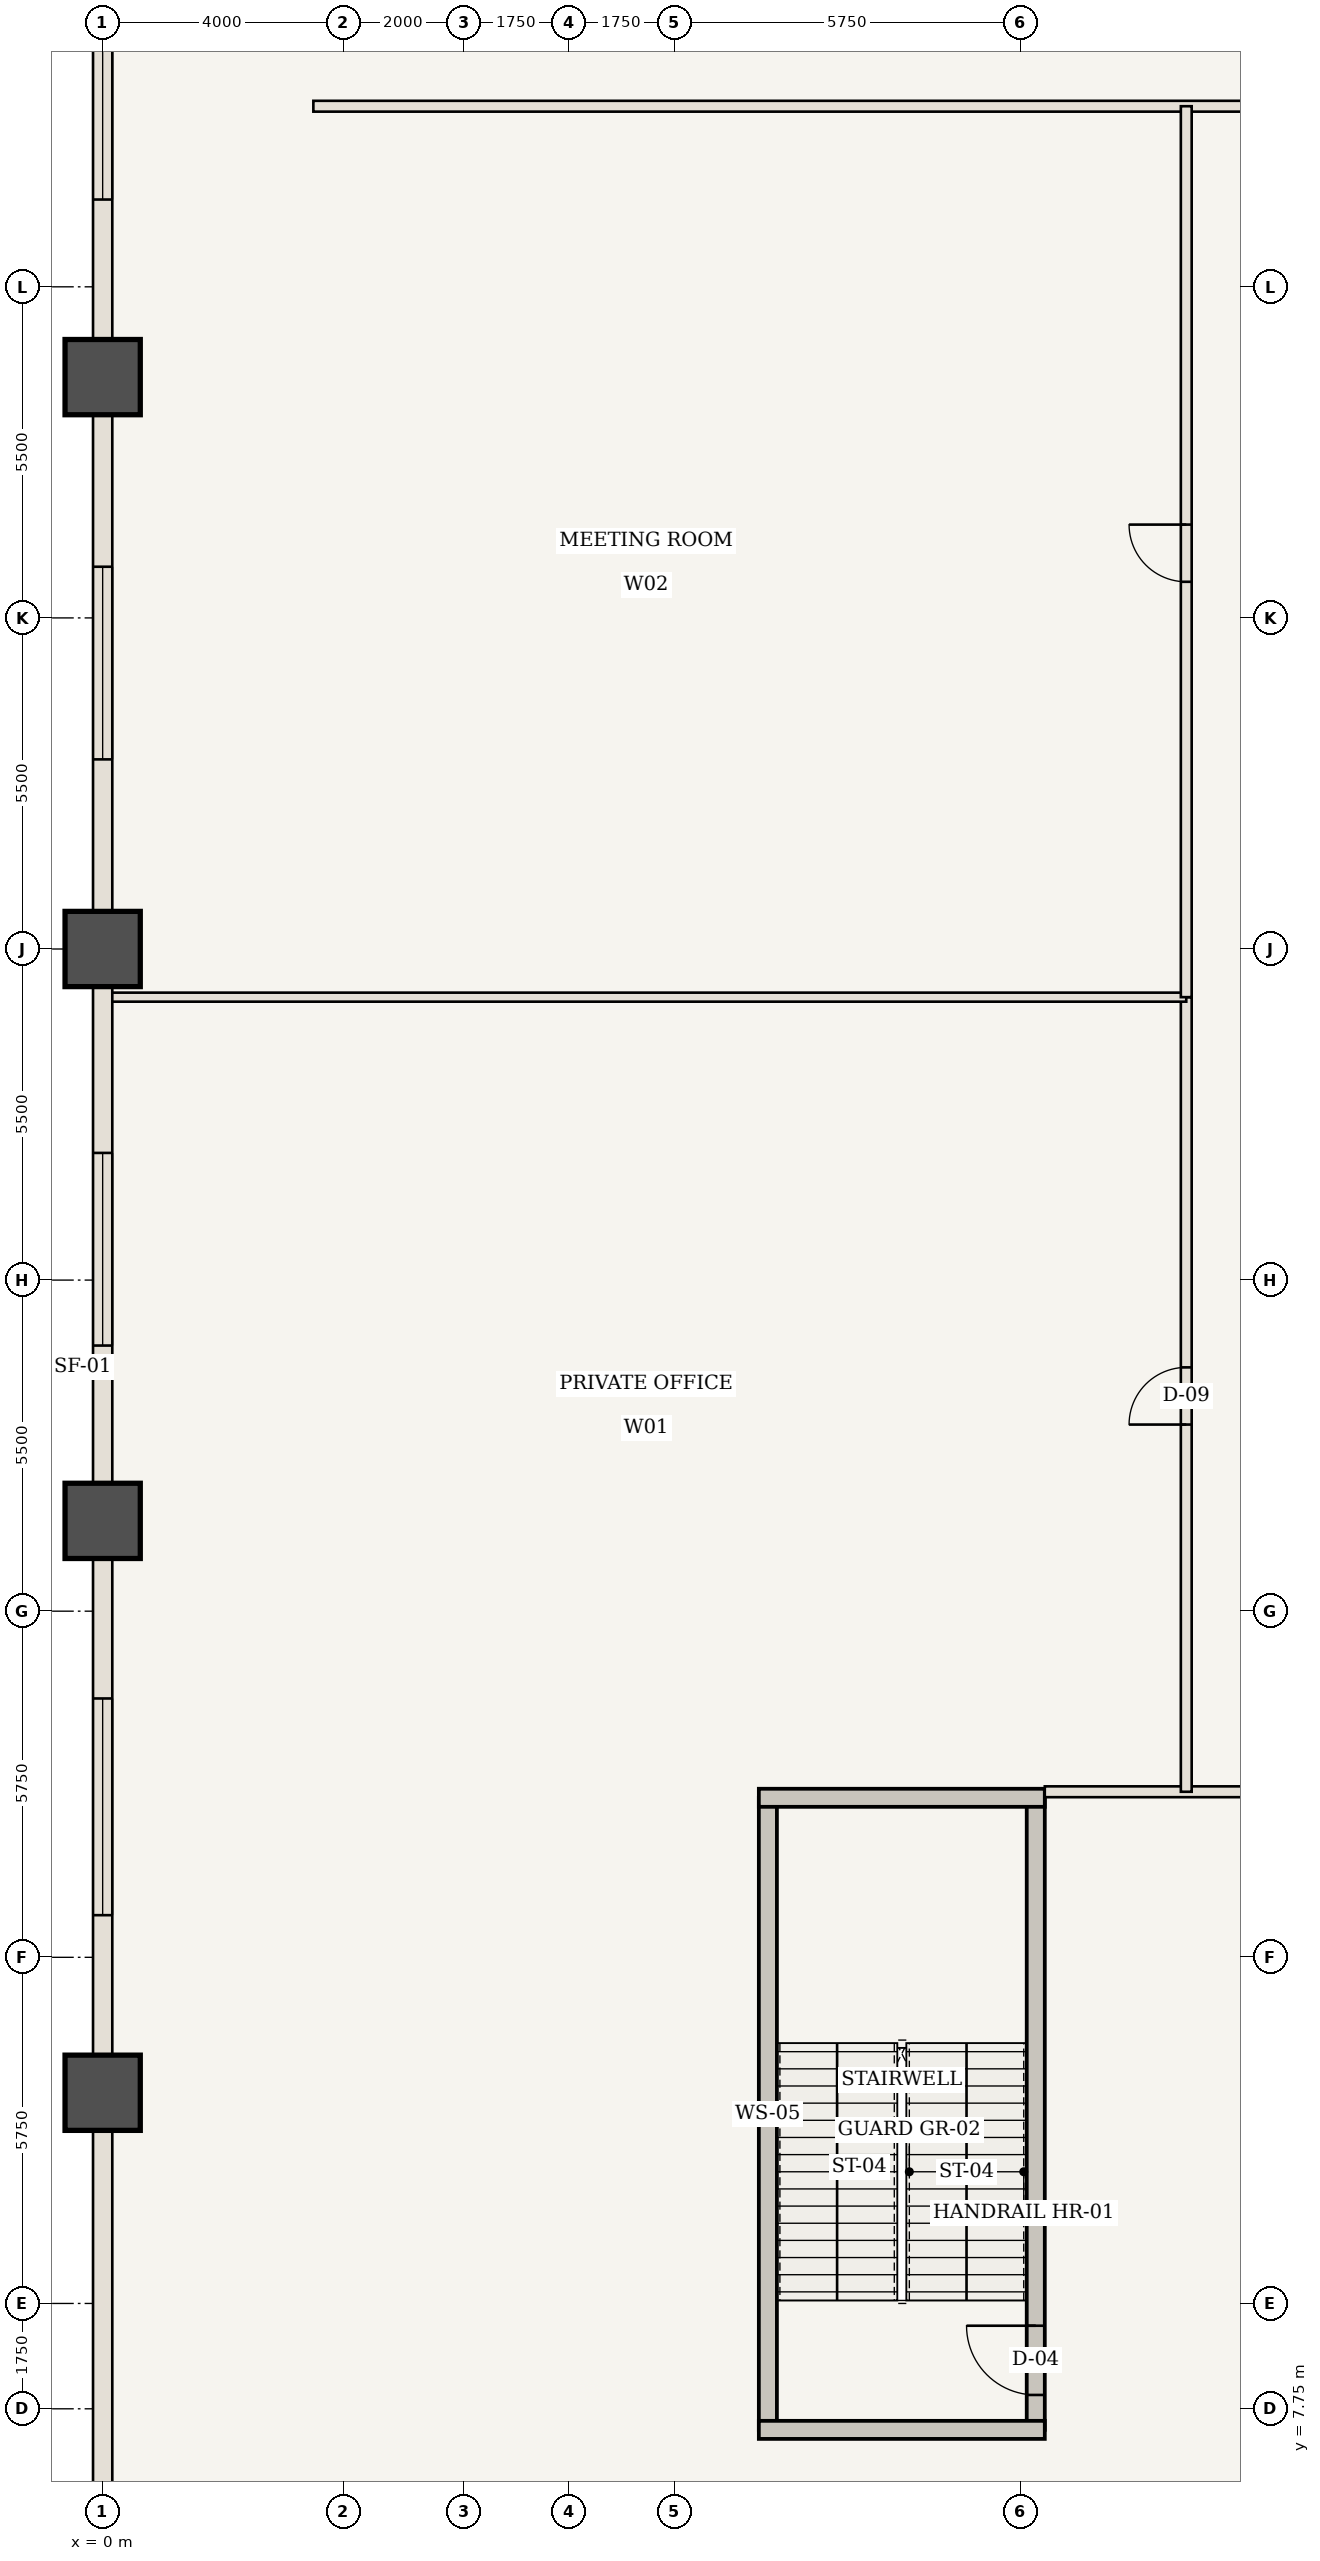
"""IFC4 building model, lengths in metres.
Left out: names, types, materials, properties, quantities, classifications, styles, units other than length and angle.
Written with IfcOpenShell. Run it as: python <this file> out.ifc"""

import sys

from ifc_helpers import new_model, si_unit, direction, frame, frame_2d, origin, origin_2d, place, context, subcontext, project, spatial, rectangle, extrude, element, fill, save


model = new_model("IFC4")
c1 = context("Model", 3, precision=1e-05, world=origin(), true_north=direction((0.0, 1.0)))
c2 = subcontext(c1, "Body", "Model", "MODEL_VIEW")
j1 = project(units=[si_unit("LENGTHUNIT", "METRE"), si_unit("PLANEANGLEUNIT", "RADIAN")], contexts=[c1])
p1 = place(None, origin())
s1 = spatial("IfcSite", under=j1, at=p1, CompositionType="ELEMENT")
p2 = place(p1, origin())
s2 = spatial("IfcBuilding", under=s1, at=p2, CompositionType="ELEMENT")
p3 = place(p2, frame((0.0, 0.0, 23.8)))
s3 = spatial("IfcBuildingStorey", under=s2, at=p3, CompositionType="ELEMENT", Elevation=23.8)
for number, where, z_axis, x_axis in (
    (1, (0.0, 13.0, 0.0), (0.0, 0.0, 1.0), (1.0, 0.0, 0.0)),
    (2, (0.0, 22.5, 0.0), (0.0, 0.0, 1.0), (1.0, 0.0, 0.0)),
    (3, (0.0, 32.0, 0.0), (0.0, 0.0, 1.0), (1.0, 0.0, 0.0)),
    (4, (0.0, 41.5, 0.0), (0.0, 0.0, 1.0), (1.0, 0.0, 0.0)),
):
    element("IfcColumn", number, at=place(p3, frame(where, z_axis=z_axis, x_axis=x_axis)), inside=s3, PredefinedType="COLUMN", context=c2, shape_type="SweptSolid", body=[
        extrude(rectangle(XDim=1.25, YDim=1.25, at=origin_2d()), origin(), (0.0, 0.0, 1.0), 5.6),
    ])
p4 = place(p3, frame((11.05, 7.4, 0.0), z_axis=(0.0, 0.0, 1.0), x_axis=(0.0, 1.0, 0.0)))
e5 = element("IfcWall", 5, at=p4, inside=s3, PredefinedType="SHEAR", context=c2, shape_type="SweptSolid", body=[
    extrude(rectangle(XDim=10.5, YDim=0.3, at=frame_2d((5.25, 0.0))), origin(), (0.0, 0.0, 1.0), 5.18),
])
p5 = place(p3, frame((15.5, 7.4, 0.0), z_axis=(0.0, 0.0, 1.0), x_axis=(0.0, 1.0, 0.0)))
e6 = element("IfcWall", 6, at=p5, inside=s3, PredefinedType="SHEAR", context=c2, shape_type="SweptSolid", body=[
    extrude(rectangle(XDim=10.5, YDim=0.3, at=frame_2d((5.25, 0.0))), origin(), (0.0, 0.0, 1.0), 5.18),
])
p6 = place(p5, frame((0.58, 0.0, 0.0)))
e7 = element("IfcOpeningElement", 7, at=p6, cuts=e6, PredefinedType="OPENING", context=c2, shape_type="SweptSolid", body=[
    extrude(rectangle(XDim=1.15, YDim=2.15, at=frame_2d((0.575, 1.075))), frame((0.0, 0.16, 0.0), z_axis=(0.0, -1.0, 0.0), x_axis=(1.0, 0.0, 0.0)), (0.0, 0.0, 1.0), 0.32),
])
for number, where, z_axis, x_axis in (
    (8, (10.9, 7.4, 0.0), (0.0, 0.0, 1.0), (1.0, 0.0, 0.0)),
    (9, (10.9, 17.9, 0.0), (0.0, 0.0, 1.0), (1.0, 0.0, 0.0)),
):
    element("IfcWall", number, at=place(p3, frame(where, z_axis=z_axis, x_axis=x_axis)), inside=s3, PredefinedType="SHEAR", context=c2, shape_type="SweptSolid", body=[
        extrude(rectangle(XDim=4.75, YDim=0.3, at=frame_2d((2.375, 0.0))), origin(), (0.0, 0.0, 1.0), 5.18),
    ])
p7 = place(p3, frame((15.65, 18.0, 0.0), z_axis=(0.0, 0.0, 1.0), x_axis=(1.0, 0.0, 0.0)))
e10 = element("IfcWall", 10, at=p7, inside=s3, PredefinedType="STANDARD", context=c2, shape_type="SweptSolid", body=[
    extrude(rectangle(XDim=25.35, YDim=0.18, at=frame_2d((12.675, 0.0))), origin(), (0.0, 0.0, 1.0), 5.18),
])
p8 = place(p7, frame((14.825, 0.0, 0.0)))
e11 = element("IfcOpeningElement", 11, at=p8, cuts=e10, PredefinedType="OPENING", context=c2, shape_type="SweptSolid", body=[
    extrude(rectangle(XDim=1.8, YDim=2.35, at=frame_2d((0.9, 1.175))), frame((0.0, 0.1, 0.0), z_axis=(0.0, -1.0, 0.0), x_axis=(1.0, 0.0, 0.0)), (0.0, 0.0, 1.0), 0.2),
])
p9 = place(p3, frame((3.5, 46.0, 0.0), z_axis=(0.0, 0.0, 1.0), x_axis=(1.0, 0.0, 0.0)))
e12 = element("IfcWall", 12, at=p9, inside=s3, PredefinedType="STANDARD", context=c2, shape_type="SweptSolid", body=[
    extrude(rectangle(XDim=20.0, YDim=0.18, at=frame_2d((10.0, 0.0))), origin(), (0.0, 0.0, 1.0), 5.18),
])
p10 = place(p9, frame((16.45, 0.0, 0.0)))
e13 = element("IfcOpeningElement", 13, at=p10, cuts=e12, PredefinedType="OPENING", context=c2, shape_type="SweptSolid", body=[
    extrude(rectangle(XDim=1.25, YDim=2.2, at=frame_2d((0.625, 1.1))), frame((0.0, 0.1, 0.0), z_axis=(0.0, -1.0, 0.0), x_axis=(1.0, 0.0, 0.0)), (0.0, 0.0, 1.0), 0.2),
])
p11 = place(p3, frame((18.0, 18.0, 0.0), z_axis=(0.0, 0.0, 1.0), x_axis=(0.0, 1.0, 0.0)))
e14 = element("IfcWall", 14, at=p11, inside=s3, PredefinedType="STANDARD", context=c2, shape_type="SweptSolid", body=[
    extrude(rectangle(XDim=13.2, YDim=0.18, at=frame_2d((6.6, 0.0))), origin(), (0.0, 0.0, 1.0), 5.18),
])
p12 = place(p11, frame((6.1, 0.0, 0.0)))
e15 = element("IfcOpeningElement", 15, at=p12, cuts=e14, PredefinedType="OPENING", context=c2, shape_type="SweptSolid", body=[
    extrude(rectangle(XDim=0.95, YDim=2.15, at=frame_2d((0.475, 1.075))), frame((0.0, 0.1, 0.0), z_axis=(0.0, -1.0, 0.0), x_axis=(1.0, 0.0, 0.0)), (0.0, 0.0, 1.0), 0.2),
])
p13 = place(p3, frame((0.06, 31.2, 0.0), z_axis=(0.0, 0.0, 1.0), x_axis=(1.0, 0.0, 0.0)))
e16 = element("IfcWall", 16, at=p13, inside=s3, PredefinedType="STANDARD", context=c2, shape_type="SweptSolid", body=[
    extrude(rectangle(XDim=17.94, YDim=0.15, at=frame_2d((8.97, 0.0))), origin(), (0.0, 0.0, 1.0), 5.18),
])
p14 = place(p3, frame((18.0, 31.2, 0.0), z_axis=(0.0, 0.0, 1.0), x_axis=(0.0, 1.0, 0.0)))
e17 = element("IfcWall", 17, at=p14, inside=s3, PredefinedType="STANDARD", context=c2, shape_type="SweptSolid", body=[
    extrude(rectangle(XDim=14.8, YDim=0.18, at=frame_2d((7.4, 0.0))), origin(), (0.0, 0.0, 1.0), 5.18),
])
p15 = place(p14, frame((6.9, 0.0, 0.0)))
e18 = element("IfcOpeningElement", 18, at=p15, cuts=e17, PredefinedType="OPENING", context=c2, shape_type="SweptSolid", body=[
    extrude(rectangle(XDim=0.95, YDim=2.15, at=frame_2d((0.475, 1.075))), frame((0.0, 0.1, 0.0), z_axis=(0.0, -1.0, 0.0), x_axis=(1.0, 0.0, 0.0)), (0.0, 0.0, 1.0), 0.2),
])
p16 = place(p3, frame((0.0, 3.5, 0.0), z_axis=(0.0, 0.0, 1.0), x_axis=(0.0, 1.0, 0.0)))
e19 = element("IfcWall", 19, at=p16, inside=s3, PredefinedType="USERDEFINED", context=c2, shape_type="SweptSolid", body=[
    extrude(rectangle(XDim=9.5, YDim=0.32, at=frame_2d((4.75, 0.0))), origin(), (0.0, 0.0, 1.0), 4.28),
])
p17 = place(p3, frame((0.0, 13.0, 0.0), z_axis=(0.0, 0.0, 1.0), x_axis=(0.0, 1.0, 0.0)))
e20 = element("IfcWall", 20, at=p17, inside=s3, PredefinedType="USERDEFINED", context=c2, shape_type="SweptSolid", body=[
    extrude(rectangle(XDim=9.5, YDim=0.32, at=frame_2d((4.75, 0.0))), origin(), (0.0, 0.0, 1.0), 4.28),
])
p18 = place(p17, frame((2.95, 0.0, 0.85)))
e21 = element("IfcOpeningElement", 21, at=p18, cuts=e20, PredefinedType="OPENING", context=c2, shape_type="SweptSolid", body=[
    extrude(rectangle(XDim=3.6, YDim=2.6, at=frame_2d((1.8, 1.3))), frame((0.0, 0.17, 0.0), z_axis=(0.0, -1.0, 0.0), x_axis=(1.0, 0.0, 0.0)), (0.0, 0.0, 1.0), 0.34),
])
p19 = place(p3, frame((0.0, 22.5, 0.0), z_axis=(0.0, 0.0, 1.0), x_axis=(0.0, 1.0, 0.0)))
e22 = element("IfcWall", 22, at=p19, inside=s3, PredefinedType="USERDEFINED", context=c2, shape_type="SweptSolid", body=[
    extrude(rectangle(XDim=9.5, YDim=0.32, at=frame_2d((4.75, 0.0))), origin(), (0.0, 0.0, 1.0), 4.28),
])
p20 = place(p19, frame((2.913, 0.0, 0.85)))
e23 = element("IfcOpeningElement", 23, at=p20, cuts=e22, PredefinedType="OPENING", context=c2, shape_type="SweptSolid", body=[
    extrude(rectangle(XDim=3.2, YDim=2.4, at=frame_2d((1.6, 1.2))), frame((0.0, 0.17, 0.0), z_axis=(0.0, -1.0, 0.0), x_axis=(1.0, 0.0, 0.0)), (0.0, 0.0, 1.0), 0.34),
])
p21 = place(p3, frame((0.0, 32.0, 0.0), z_axis=(0.0, 0.0, 1.0), x_axis=(0.0, 1.0, 0.0)))
e24 = element("IfcWall", 24, at=p21, inside=s3, PredefinedType="USERDEFINED", context=c2, shape_type="SweptSolid", body=[
    extrude(rectangle(XDim=9.5, YDim=0.32, at=frame_2d((4.75, 0.0))), origin(), (0.0, 0.0, 1.0), 4.28),
])
p22 = place(p21, frame((3.15, 0.0, 0.85)))
e25 = element("IfcOpeningElement", 25, at=p22, cuts=e24, PredefinedType="OPENING", context=c2, shape_type="SweptSolid", body=[
    extrude(rectangle(XDim=3.2, YDim=2.4, at=frame_2d((1.6, 1.2))), frame((0.0, 0.17, 0.0), z_axis=(0.0, -1.0, 0.0), x_axis=(1.0, 0.0, 0.0)), (0.0, 0.0, 1.0), 0.34),
])
p23 = place(p3, frame((0.0, 41.5, 0.0), z_axis=(0.0, 0.0, 1.0), x_axis=(0.0, 1.0, 0.0)))
e26 = element("IfcWall", 26, at=p23, inside=s3, PredefinedType="USERDEFINED", context=c2, shape_type="SweptSolid", body=[
    extrude(rectangle(XDim=9.5, YDim=0.32, at=frame_2d((4.75, 0.0))), origin(), (0.0, 0.0, 1.0), 4.28),
])
p24 = place(p23, frame((2.95, 0.0, 0.85)))
e27 = element("IfcOpeningElement", 27, at=p24, cuts=e26, PredefinedType="OPENING", context=c2, shape_type="SweptSolid", body=[
    extrude(rectangle(XDim=3.6, YDim=2.6, at=frame_2d((1.8, 1.3))), frame((0.0, 0.17, 0.0), z_axis=(0.0, -1.0, 0.0), x_axis=(1.0, 0.0, 0.0)), (0.0, 0.0, 1.0), 0.34),
])
p25 = place(p6, origin())
e28 = element("IfcDoor", 28, at=p25, inside=s3, OperationType="SINGLE_SWING_RIGHT", PredefinedType="DOOR", context=c2, shape_type="SweptSolid", body=[
    extrude(rectangle(XDim=1.15, YDim=2.15, at=frame_2d((0.575, 1.075))), frame((0.0, 0.025, 0.0), z_axis=(0.0, -1.0, 0.0), x_axis=(1.0, 0.0, 0.0)), (0.0, 0.0, 1.0), 0.05),
])
fill(e7, e28)
p26 = place(p12, origin())
e29 = element("IfcDoor", 29, at=p26, inside=s3, OperationType="SINGLE_SWING_LEFT", PredefinedType="DOOR", context=c2, shape_type="SweptSolid", body=[
    extrude(rectangle(XDim=0.95, YDim=2.15, at=frame_2d((0.475, 1.075))), frame((0.0, 0.025, 0.0), z_axis=(0.0, -1.0, 0.0), x_axis=(1.0, 0.0, 0.0)), (0.0, 0.0, 1.0), 0.05),
])
fill(e15, e29)
p27 = place(p15, origin())
e30 = element("IfcDoor", 30, at=p27, inside=s3, OperationType="SINGLE_SWING_RIGHT", PredefinedType="DOOR", context=c2, shape_type="SweptSolid", body=[
    extrude(rectangle(XDim=0.95, YDim=2.15, at=frame_2d((0.475, 1.075))), frame((0.0, 0.025, 0.0), z_axis=(0.0, -1.0, 0.0), x_axis=(1.0, 0.0, 0.0)), (0.0, 0.0, 1.0), 0.05),
])
fill(e18, e30)
p28 = place(p18, origin())
e31 = element("IfcWindow", 31, at=p28, inside=s3, PartitioningType="SINGLE_PANEL", PredefinedType="WINDOW", context=c2, shape_type="SweptSolid", body=[
    extrude(rectangle(XDim=3.6, YDim=2.6, at=frame_2d((1.8, 1.3))), frame((0.0, 0.03, 0.0), z_axis=(0.0, -1.0, 0.0), x_axis=(1.0, 0.0, 0.0)), (0.0, 0.0, 1.0), 0.06),
])
fill(e21, e31)
p29 = place(p20, origin())
e32 = element("IfcWindow", 32, at=p29, inside=s3, PartitioningType="SINGLE_PANEL", PredefinedType="WINDOW", context=c2, shape_type="SweptSolid", body=[
    extrude(rectangle(XDim=3.2, YDim=2.4, at=frame_2d((1.6, 1.2))), frame((0.0, 0.03, 0.0), z_axis=(0.0, -1.0, 0.0), x_axis=(1.0, 0.0, 0.0)), (0.0, 0.0, 1.0), 0.06),
])
fill(e23, e32)
p30 = place(p22, origin())
e33 = element("IfcWindow", 33, at=p30, inside=s3, PartitioningType="SINGLE_PANEL", PredefinedType="WINDOW", context=c2, shape_type="SweptSolid", body=[
    extrude(rectangle(XDim=3.2, YDim=2.4, at=frame_2d((1.6, 1.2))), frame((0.0, 0.03, 0.0), z_axis=(0.0, -1.0, 0.0), x_axis=(1.0, 0.0, 0.0)), (0.0, 0.0, 1.0), 0.06),
])
fill(e25, e33)
p31 = place(p24, origin())
e34 = element("IfcWindow", 34, at=p31, inside=s3, PartitioningType="SINGLE_PANEL", PredefinedType="WINDOW", context=c2, shape_type="SweptSolid", body=[
    extrude(rectangle(XDim=3.6, YDim=2.6, at=frame_2d((1.8, 1.3))), frame((0.0, 0.03, 0.0), z_axis=(0.0, -1.0, 0.0), x_axis=(1.0, 0.0, 0.0)), (0.0, 0.0, 1.0), 0.06),
])
fill(e27, e34)
save(model, sys.argv[1])
